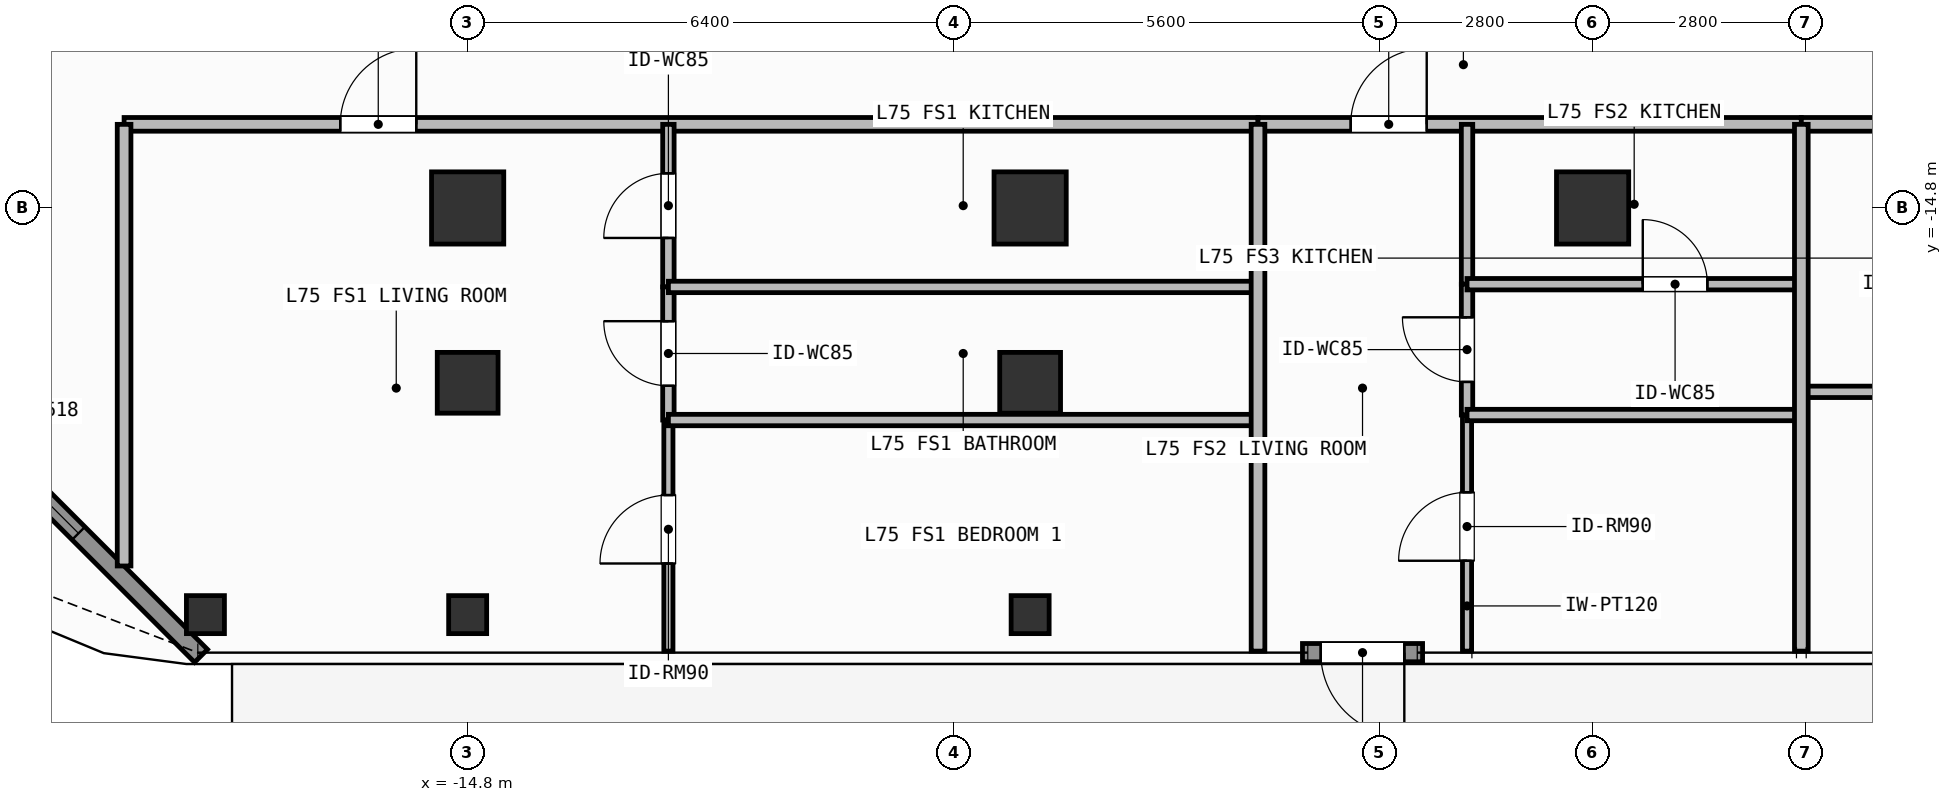
"""IFC4 building model, lengths in metres.
Left out: names, types, materials, properties, quantities, classifications, styles, units other than length and angle.
Written with IfcOpenShell. Run it as: python <this file> out.ifc"""

import sys

from ifc_helpers import new_model, si_unit, direction, frame, frame_2d, origin, origin_2d, place, context, subcontext, project, spatial, rectangle, hollow_rectangle, extrude, element, fill, save


model = new_model("IFC4")
c1 = context("Model", 3, precision=1e-05, world=origin(), true_north=direction((0.0, 1.0)))
c2 = subcontext(c1, "Body", "Model", "MODEL_VIEW")
j1 = project(units=[si_unit("LENGTHUNIT", "METRE"), si_unit("PLANEANGLEUNIT", "RADIAN")], contexts=[c1])
p1 = place(None, origin())
s1 = spatial("IfcSite", under=j1, at=p1, CompositionType="ELEMENT")
p2 = place(p1, origin())
s2 = spatial("IfcBuilding", under=s1, at=p2, CompositionType="ELEMENT")
p3 = place(p2, frame((0.0, 0.0, 305.4)))
s3 = spatial("IfcBuildingStorey", under=s2, at=p3, CompositionType="ELEMENT", Elevation=305.4)
for number, where, z_axis, x_axis in (
    (1, (-14.8, -14.8, 0.0), (0.0, 0.0, 1.0), (1.0, 0.0, 0.0)),
    (2, (-7.4, -14.8, 0.0), (0.0, 0.0, 1.0), (1.0, 0.0, 0.0)),
    (3, (0.0, -14.8, 0.0), (0.0, 0.0, 1.0), (1.0, 0.0, 0.0)),
):
    element("IfcColumn", number, at=place(p3, frame(where, z_axis=z_axis, x_axis=x_axis)), inside=s3, PredefinedType="COLUMN", context=c2, shape_type="SweptSolid", body=[
        extrude(rectangle(XDim=0.95, YDim=0.95, at=origin_2d()), origin(), (0.0, 0.0, 1.0), 3.9),
    ])
for number, where, z_axis, x_axis in (
    (4, (-14.8, -17.1, 0.0), (0.0, 0.0, 1.0), (1.0, 0.0, 0.0)),
    (5, (-7.4, -17.1, 0.0), (0.0, 0.0, 1.0), (1.0, 0.0, 0.0)),
):
    element("IfcColumn", number, at=place(p3, frame(where, z_axis=z_axis, x_axis=x_axis)), inside=s3, PredefinedType="COLUMN", context=c2, shape_type="SweptSolid", body=[
        extrude(hollow_rectangle(XDim=0.8, YDim=0.8, WallThickness=0.036, at=origin_2d()), origin(), (0.0, 0.0, 1.0), 3.9),
    ])
for number, where, z_axis, x_axis in (
    (6, (-18.25, -20.15, 0.0), (0.0, 0.0, 1.0), (1.0, 0.0, 0.0)),
    (7, (-14.8, -20.15, 0.0), (0.0, 0.0, 1.0), (1.0, 0.0, 0.0)),
    (8, (-7.4, -20.15, 0.0), (0.0, 0.0, 1.0), (1.0, 0.0, 0.0)),
):
    element("IfcColumn", number, at=place(p3, frame(where, z_axis=z_axis, x_axis=x_axis)), inside=s3, PredefinedType="COLUMN", context=c2, shape_type="SweptSolid", body=[
        extrude(hollow_rectangle(XDim=0.5, YDim=0.5, WallThickness=0.025, at=origin_2d()), origin(), (0.0, 0.0, 1.0), 3.9),
    ])
p4 = place(p3, frame((-2.237, -20.65, 0.0), z_axis=(0.0, 0.0, 1.0), x_axis=(-1.0, 0.0, 0.0)))
e9 = element("IfcWall", 9, at=p4, inside=s3, PredefinedType="SOLIDWALL", context=c2, shape_type="SweptSolid", body=[
    extrude(rectangle(XDim=1.58, YDim=0.24, at=frame_2d((0.79, 0.0))), origin(), (0.0, 0.0, 1.0), 3.68),
])
p5 = place(p4, frame((0.24, 0.0, 0.0)))
e10 = element("IfcOpeningElement", 10, at=p5, cuts=e9, PredefinedType="OPENING", context=c2, shape_type="SweptSolid", body=[
    extrude(rectangle(XDim=1.1, YDim=2.2, at=frame_2d((0.55, 1.1))), frame((0.0, 0.13, 0.0), z_axis=(0.0, -1.0, 0.0), x_axis=(1.0, 0.0, 0.0)), (0.0, 0.0, 1.0), 0.26),
])
p6 = place(p3, frame((-18.308, -20.692, 0.0), z_axis=(0.0, 0.0, 1.0), x_axis=(-0.707106781187, 0.707106781187, 0.0)))
e11 = element("IfcWall", 11, at=p6, inside=s3, PredefinedType="SOLIDWALL", context=c2, shape_type="SweptSolid", body=[
    extrude(rectangle(XDim=6.059, YDim=0.24, at=frame_2d((3.03, 0.0))), origin(), (0.0, 0.0, 1.0), 3.68),
])
p7 = place(p6, frame((2.28, 0.0, 0.8)))
e12 = element("IfcOpeningElement", 12, at=p7, cuts=e11, PredefinedType="OPENING", context=c2, shape_type="SweptSolid", body=[
    extrude(rectangle(XDim=1.5, YDim=1.85, at=frame_2d((0.75, 0.925))), frame((0.0, 0.13, 0.0), z_axis=(0.0, -1.0, 0.0), x_axis=(1.0, 0.0, 0.0)), (0.0, 0.0, 1.0), 0.26),
])
p8 = place(p3, frame((-19.32, -13.7, 0.0), z_axis=(0.0, 0.0, 1.0), x_axis=(1.0, 0.0, 0.0)))
e13 = element("IfcWall", 13, at=p8, inside=s3, PredefinedType="PARTITIONING", context=c2, shape_type="SweptSolid", body=[
    extrude(rectangle(XDim=14.918, YDim=0.18, at=frame_2d((7.459, 0.0))), origin(), (0.0, 0.0, 1.0), 3.68),
])
p9 = place(p8, frame((2.844, 0.0, 0.0)))
e14 = element("IfcOpeningElement", 14, at=p9, cuts=e13, PredefinedType="OPENING", context=c2, shape_type="SweptSolid", body=[
    extrude(rectangle(XDim=1.0, YDim=2.2, at=frame_2d((0.5, 1.1))), frame((0.0, 0.1, 0.0), z_axis=(0.0, -1.0, 0.0), x_axis=(1.0, 0.0, 0.0)), (0.0, 0.0, 1.0), 0.2),
])
p10 = place(p3, frame((-12.159, -15.839, 0.0), z_axis=(0.0, 0.0, 1.0), x_axis=(0.0, 1.0, 0.0)))
e15 = element("IfcWall", 15, at=p10, inside=s3, PredefinedType="PARTITIONING", context=c2, shape_type="SweptSolid", body=[
    extrude(rectangle(XDim=2.139, YDim=0.15, at=frame_2d((1.07, 0.0))), origin(), (0.0, 0.0, 1.0), 3.68),
])
p11 = place(p10, frame((0.645, 0.0, 0.0)))
e16 = element("IfcOpeningElement", 16, at=p11, cuts=e15, PredefinedType="OPENING", context=c2, shape_type="SweptSolid", body=[
    extrude(rectangle(XDim=0.85, YDim=2.1, at=frame_2d((0.425, 1.05))), frame((0.0, 0.085, 0.0), z_axis=(0.0, -1.0, 0.0), x_axis=(1.0, 0.0, 0.0)), (0.0, 0.0, 1.0), 0.17),
])
p12 = place(p3, frame((-12.159, -17.59, 0.0), z_axis=(0.0, 0.0, 1.0), x_axis=(0.0, 1.0, 0.0)))
e17 = element("IfcWall", 17, at=p12, inside=s3, PredefinedType="PARTITIONING", context=c2, shape_type="SweptSolid", body=[
    extrude(rectangle(XDim=1.751, YDim=0.15, at=frame_2d((0.875, 0.0))), origin(), (0.0, 0.0, 1.0), 3.68),
])
p13 = place(p12, frame((0.45, 0.0, 0.0)))
e18 = element("IfcOpeningElement", 18, at=p13, cuts=e17, PredefinedType="OPENING", context=c2, shape_type="SweptSolid", body=[
    extrude(rectangle(XDim=0.85, YDim=2.1, at=frame_2d((0.425, 1.05))), frame((0.0, 0.085, 0.0), z_axis=(0.0, -1.0, 0.0), x_axis=(1.0, 0.0, 0.0)), (0.0, 0.0, 1.0), 0.17),
])
p14 = place(p3, frame((-12.159, -20.63, 0.0), z_axis=(0.0, 0.0, 1.0), x_axis=(0.0, 1.0, 0.0)))
e19 = element("IfcWall", 19, at=p14, inside=s3, PredefinedType="PARTITIONING", context=c2, shape_type="SweptSolid", body=[
    extrude(rectangle(XDim=3.04, YDim=0.12, at=frame_2d((1.52, 0.0))), origin(), (0.0, 0.0, 1.0), 3.68),
])
p15 = place(p14, frame((1.153, 0.0, 0.0)))
e20 = element("IfcOpeningElement", 20, at=p15, cuts=e19, PredefinedType="OPENING", context=c2, shape_type="SweptSolid", body=[
    extrude(rectangle(XDim=0.9, YDim=2.1, at=frame_2d((0.45, 1.05))), frame((0.0, 0.07, 0.0), z_axis=(0.0, -1.0, 0.0), x_axis=(1.0, 0.0, 0.0)), (0.0, 0.0, 1.0), 0.14),
])
p16 = place(p3, frame((-4.402, -13.7, 0.0), z_axis=(0.0, 0.0, 1.0), x_axis=(1.0, 0.0, 0.0)))
e21 = element("IfcWall", 21, at=p16, inside=s3, PredefinedType="PARTITIONING", context=c2, shape_type="SweptSolid", body=[
    extrude(rectangle(XDim=7.148, YDim=0.18, at=frame_2d((3.574, 0.0))), origin(), (0.0, 0.0, 1.0), 3.68),
])
p17 = place(p16, frame((1.219, 0.0, 0.0)))
e22 = element("IfcOpeningElement", 22, at=p17, cuts=e21, PredefinedType="OPENING", context=c2, shape_type="SweptSolid", body=[
    extrude(rectangle(XDim=1.0, YDim=2.2, at=frame_2d((0.5, 1.1))), frame((0.0, 0.1, 0.0), z_axis=(0.0, -1.0, 0.0), x_axis=(1.0, 0.0, 0.0)), (0.0, 0.0, 1.0), 0.2),
])
p18 = place(p3, frame((-1.652, -15.803, 0.0), z_axis=(0.0, 0.0, 1.0), x_axis=(0.0, 1.0, 0.0)))
e23 = element("IfcWall", 23, at=p18, inside=s3, PredefinedType="PARTITIONING", context=c2, shape_type="SweptSolid", body=[
    extrude(rectangle(XDim=2.103, YDim=0.15, at=frame_2d((1.052, 0.0))), origin(), (0.0, 0.0, 1.0), 3.68),
])
p19 = place(p3, frame((-1.652, -17.524, 0.0), z_axis=(0.0, 0.0, 1.0), x_axis=(0.0, 1.0, 0.0)))
e24 = element("IfcWall", 24, at=p19, inside=s3, PredefinedType="PARTITIONING", context=c2, shape_type="SweptSolid", body=[
    extrude(rectangle(XDim=1.721, YDim=0.15, at=frame_2d((0.86, 0.0))), origin(), (0.0, 0.0, 1.0), 3.68),
])
p20 = place(p19, frame((0.436, 0.0, 0.0)))
e25 = element("IfcOpeningElement", 25, at=p20, cuts=e24, PredefinedType="OPENING", context=c2, shape_type="SweptSolid", body=[
    extrude(rectangle(XDim=0.85, YDim=2.1, at=frame_2d((0.425, 1.05))), frame((0.0, 0.085, 0.0), z_axis=(0.0, -1.0, 0.0), x_axis=(1.0, 0.0, 0.0)), (0.0, 0.0, 1.0), 0.17),
])
p21 = place(p3, frame((-1.652, -20.63, 0.0), z_axis=(0.0, 0.0, 1.0), x_axis=(0.0, 1.0, 0.0)))
e26 = element("IfcWall", 26, at=p21, inside=s3, PredefinedType="PARTITIONING", context=c2, shape_type="SweptSolid", body=[
    extrude(rectangle(XDim=3.106, YDim=0.12, at=frame_2d((1.553, 0.0))), origin(), (0.0, 0.0, 1.0), 3.68),
])
p22 = place(p21, frame((1.189, 0.0, 0.0)))
e27 = element("IfcOpeningElement", 27, at=p22, cuts=e26, PredefinedType="OPENING", context=c2, shape_type="SweptSolid", body=[
    extrude(rectangle(XDim=0.9, YDim=2.1, at=frame_2d((0.45, 1.05))), frame((0.0, 0.07, 0.0), z_axis=(0.0, -1.0, 0.0), x_axis=(1.0, 0.0, 0.0)), (0.0, 0.0, 1.0), 0.14),
])
p23 = place(p3, frame((2.746, -13.7, 0.0), z_axis=(0.0, 0.0, 1.0), x_axis=(1.0, 0.0, 0.0)))
e28 = element("IfcWall", 28, at=p23, inside=s3, PredefinedType="PARTITIONING", context=c2, shape_type="SweptSolid", body=[
    extrude(rectangle(XDim=13.174, YDim=0.18, at=frame_2d((6.587, 0.0))), origin(), (0.0, 0.0, 1.0), 3.68),
])
p24 = place(p23, frame((5.189, 0.0, 0.0)))
e29 = element("IfcOpeningElement", 29, at=p24, cuts=e28, PredefinedType="OPENING", context=c2, shape_type="SweptSolid", body=[
    extrude(rectangle(XDim=1.0, YDim=2.2, at=frame_2d((0.5, 1.1))), frame((0.0, 0.1, 0.0), z_axis=(0.0, -1.0, 0.0), x_axis=(1.0, 0.0, 0.0)), (0.0, 0.0, 1.0), 0.2),
])
p25 = place(p3, frame((-19.32, -19.51, 0.0), z_axis=(0.0, 0.0, 1.0), x_axis=(0.0, 1.0, 0.0)))
e30 = element("IfcWall", 30, at=p25, inside=s3, PredefinedType="PARTITIONING", context=c2, shape_type="SweptSolid", body=[
    extrude(rectangle(XDim=5.81, YDim=0.18, at=frame_2d((2.905, 0.0))), origin(), (0.0, 0.0, 1.0), 3.68),
])
for number, where, z_axis, x_axis in (
    (31, (-12.159, -15.839, 0.0), (0.0, 0.0, 1.0), (1.0, 0.0, 0.0)),
    (32, (-12.159, -17.59, 0.0), (0.0, 0.0, 1.0), (1.0, 0.0, 0.0)),
):
    element("IfcWall", number, at=place(p3, frame(where, z_axis=z_axis, x_axis=x_axis)), inside=s3, PredefinedType="PARTITIONING", context=c2, shape_type="SweptSolid", body=[
        extrude(rectangle(XDim=7.757, YDim=0.15, at=frame_2d((3.878, 0.0))), origin(), (0.0, 0.0, 1.0), 3.68),
    ])
p26 = place(p3, frame((-1.652, -15.803, 0.0), z_axis=(0.0, 0.0, 1.0), x_axis=(1.0, 0.0, 0.0)))
e33 = element("IfcWall", 33, at=p26, inside=s3, PredefinedType="PARTITIONING", context=c2, shape_type="SweptSolid", body=[
    extrude(rectangle(XDim=4.398, YDim=0.15, at=frame_2d((2.199, 0.0))), origin(), (0.0, 0.0, 1.0), 3.68),
])
p27 = place(p26, frame((2.312, 0.0, 0.0)))
e34 = element("IfcOpeningElement", 34, at=p27, cuts=e33, PredefinedType="OPENING", context=c2, shape_type="SweptSolid", body=[
    extrude(rectangle(XDim=0.85, YDim=2.1, at=frame_2d((0.425, 1.05))), frame((0.0, 0.085, 0.0), z_axis=(0.0, -1.0, 0.0), x_axis=(1.0, 0.0, 0.0)), (0.0, 0.0, 1.0), 0.17),
])
p28 = place(p3, frame((-1.652, -17.524, 0.0), z_axis=(0.0, 0.0, 1.0), x_axis=(1.0, 0.0, 0.0)))
e35 = element("IfcWall", 35, at=p28, inside=s3, PredefinedType="PARTITIONING", context=c2, shape_type="SweptSolid", body=[
    extrude(rectangle(XDim=4.398, YDim=0.15, at=frame_2d((2.199, 0.0))), origin(), (0.0, 0.0, 1.0), 3.68),
])
p29 = place(p3, frame((-4.402, -20.63, 0.0), z_axis=(0.0, 0.0, 1.0), x_axis=(0.0, 1.0, 0.0)))
e36 = element("IfcWall", 36, at=p29, inside=s3, PredefinedType="PARTITIONING", context=c2, shape_type="SweptSolid", body=[
    extrude(rectangle(XDim=6.93, YDim=0.18, at=frame_2d((3.465, 0.0))), origin(), (0.0, 0.0, 1.0), 3.68),
])
p30 = place(p3, frame((2.746, -17.219, 0.0), z_axis=(0.0, 0.0, 1.0), x_axis=(1.0, 0.0, 0.0)))
e37 = element("IfcWall", 37, at=p30, inside=s3, PredefinedType="PARTITIONING", context=c2, shape_type="SweptSolid", body=[
    extrude(rectangle(XDim=3.239, YDim=0.15, at=frame_2d((1.62, 0.0))), origin(), (0.0, 0.0, 1.0), 3.182),
])
p31 = place(p3, frame((2.746, -20.63, 0.0), z_axis=(0.0, 0.0, 1.0), x_axis=(0.0, 1.0, 0.0)))
e38 = element("IfcWall", 38, at=p31, inside=s3, PredefinedType="PARTITIONING", context=c2, shape_type="SweptSolid", body=[
    extrude(rectangle(XDim=6.93, YDim=0.18, at=frame_2d((3.465, 0.0))), origin(), (0.0, 0.0, 1.0), 3.68),
])
p32 = place(p5, origin())
e39 = element("IfcDoor", 39, at=p32, inside=s3, OperationType="SINGLE_SWING_LEFT", PredefinedType="DOOR", context=c2, shape_type="SweptSolid", body=[
    extrude(rectangle(XDim=1.1, YDim=2.2, at=frame_2d((0.55, 1.1))), frame((0.0, 0.025, 0.0), z_axis=(0.0, -1.0, 0.0), x_axis=(1.0, 0.0, 0.0)), (0.0, 0.0, 1.0), 0.05),
])
fill(e10, e39)
p33 = place(p7, origin())
e40 = element("IfcWindow", 40, at=p33, inside=s3, PartitioningType="SINGLE_PANEL", PredefinedType="WINDOW", context=c2, shape_type="SweptSolid", body=[
    extrude(rectangle(XDim=1.5, YDim=1.85, at=frame_2d((0.75, 0.925))), frame((0.0, 0.03, 0.0), z_axis=(0.0, -1.0, 0.0), x_axis=(1.0, 0.0, 0.0)), (0.0, 0.0, 1.0), 0.06),
])
fill(e12, e40)
p34 = place(p9, origin())
e41 = element("IfcDoor", 41, at=p34, inside=s3, OperationType="SINGLE_SWING_RIGHT", PredefinedType="DOOR", context=c2, shape_type="SweptSolid", body=[
    extrude(rectangle(XDim=1.0, YDim=2.2, at=frame_2d((0.5, 1.1))), frame((0.0, 0.025, 0.0), z_axis=(0.0, -1.0, 0.0), x_axis=(1.0, 0.0, 0.0)), (0.0, 0.0, 1.0), 0.05),
])
fill(e14, e41)
p35 = place(p11, origin())
e42 = element("IfcDoor", 42, at=p35, inside=s3, OperationType="SINGLE_SWING_LEFT", PredefinedType="DOOR", context=c2, shape_type="SweptSolid", body=[
    extrude(rectangle(XDim=0.85, YDim=2.1, at=frame_2d((0.425, 1.05))), frame((0.0, 0.025, 0.0), z_axis=(0.0, -1.0, 0.0), x_axis=(1.0, 0.0, 0.0)), (0.0, 0.0, 1.0), 0.05),
])
fill(e16, e42)
p36 = place(p13, origin())
e43 = element("IfcDoor", 43, at=p36, inside=s3, OperationType="SINGLE_SWING_RIGHT", PredefinedType="DOOR", context=c2, shape_type="SweptSolid", body=[
    extrude(rectangle(XDim=0.85, YDim=2.1, at=frame_2d((0.425, 1.05))), frame((0.0, 0.025, 0.0), z_axis=(0.0, -1.0, 0.0), x_axis=(1.0, 0.0, 0.0)), (0.0, 0.0, 1.0), 0.05),
])
fill(e18, e43)
p37 = place(p15, origin())
e44 = element("IfcDoor", 44, at=p37, inside=s3, OperationType="SINGLE_SWING_LEFT", PredefinedType="DOOR", context=c2, shape_type="SweptSolid", body=[
    extrude(rectangle(XDim=0.9, YDim=2.1, at=frame_2d((0.45, 1.05))), frame((0.0, 0.025, 0.0), z_axis=(0.0, -1.0, 0.0), x_axis=(1.0, 0.0, 0.0)), (0.0, 0.0, 1.0), 0.05),
])
fill(e20, e44)
p38 = place(p17, origin())
e45 = element("IfcDoor", 45, at=p38, inside=s3, OperationType="SINGLE_SWING_RIGHT", PredefinedType="DOOR", context=c2, shape_type="SweptSolid", body=[
    extrude(rectangle(XDim=1.0, YDim=2.2, at=frame_2d((0.5, 1.1))), frame((0.0, 0.025, 0.0), z_axis=(0.0, -1.0, 0.0), x_axis=(1.0, 0.0, 0.0)), (0.0, 0.0, 1.0), 0.05),
])
fill(e22, e45)
p39 = place(p27, origin())
e46 = element("IfcDoor", 46, at=p39, inside=s3, OperationType="SINGLE_SWING_LEFT", PredefinedType="DOOR", context=c2, shape_type="SweptSolid", body=[
    extrude(rectangle(XDim=0.85, YDim=2.1, at=frame_2d((0.425, 1.05))), frame((0.0, 0.025, 0.0), z_axis=(0.0, -1.0, 0.0), x_axis=(1.0, 0.0, 0.0)), (0.0, 0.0, 1.0), 0.05),
])
fill(e34, e46)
p40 = place(p20, origin())
e47 = element("IfcDoor", 47, at=p40, inside=s3, OperationType="SINGLE_SWING_RIGHT", PredefinedType="DOOR", context=c2, shape_type="SweptSolid", body=[
    extrude(rectangle(XDim=0.85, YDim=2.1, at=frame_2d((0.425, 1.05))), frame((0.0, 0.025, 0.0), z_axis=(0.0, -1.0, 0.0), x_axis=(1.0, 0.0, 0.0)), (0.0, 0.0, 1.0), 0.05),
])
fill(e25, e47)
p41 = place(p22, origin())
e48 = element("IfcDoor", 48, at=p41, inside=s3, OperationType="SINGLE_SWING_LEFT", PredefinedType="DOOR", context=c2, shape_type="SweptSolid", body=[
    extrude(rectangle(XDim=0.9, YDim=2.1, at=frame_2d((0.45, 1.05))), frame((0.0, 0.025, 0.0), z_axis=(0.0, -1.0, 0.0), x_axis=(1.0, 0.0, 0.0)), (0.0, 0.0, 1.0), 0.05),
])
fill(e27, e48)
save(model, sys.argv[1])
